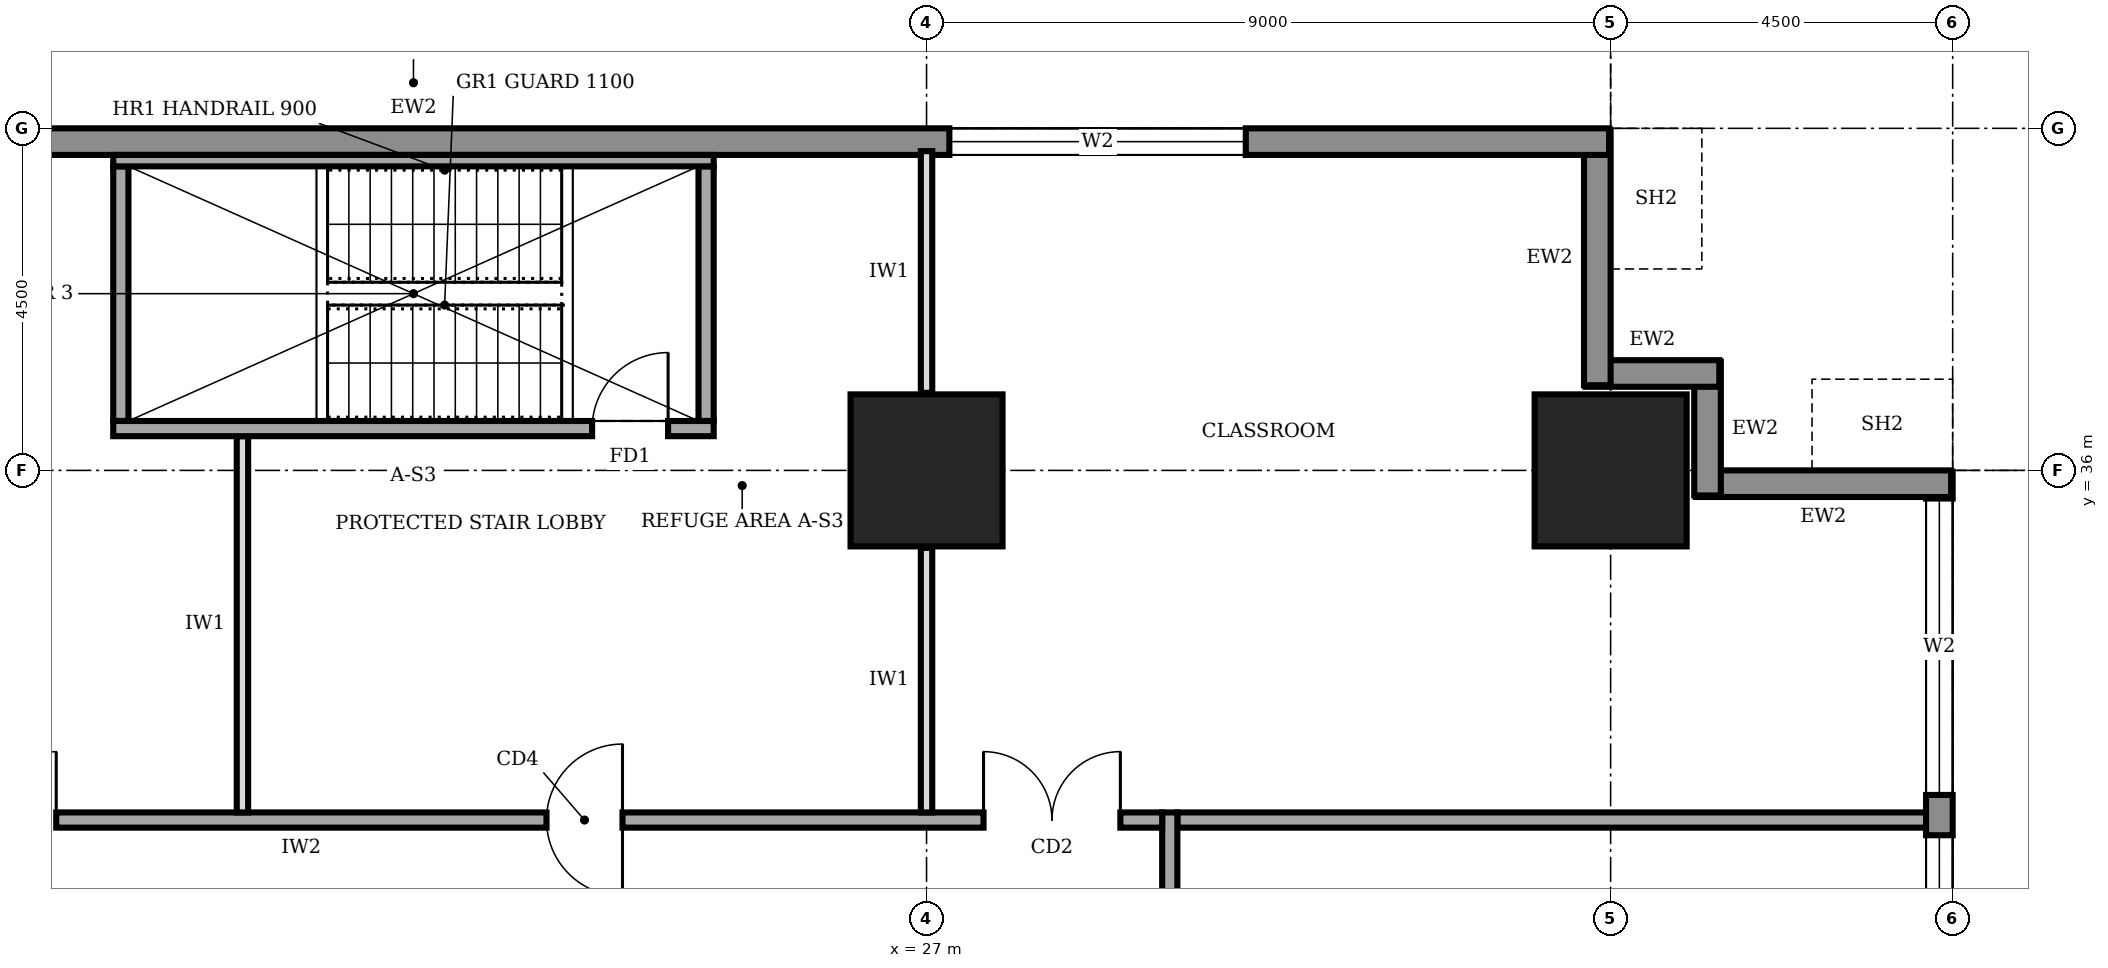
"""IFC4 building model, lengths in metres.
Left out: names, types, materials, properties, quantities, classifications, styles, units other than length and angle.
Written with IfcOpenShell. Run it as: python <this file> out.ifc"""

import sys

from ifc_helpers import new_model, si_unit, direction, frame, frame_2d, origin, origin_2d, place, context, subcontext, project, spatial, rectangle, extrude, element, fill, save


model = new_model("IFC4")
c1 = context("Model", 3, precision=1e-05, world=origin(), true_north=direction((0.0, 1.0)))
c2 = subcontext(c1, "Body", "Model", "MODEL_VIEW")
j1 = project(units=[si_unit("LENGTHUNIT", "METRE"), si_unit("PLANEANGLEUNIT", "RADIAN")], contexts=[c1])
p1 = place(None, origin())
s1 = spatial("IfcSite", under=j1, at=p1, CompositionType="ELEMENT")
p2 = place(p1, origin())
s2 = spatial("IfcBuilding", under=s1, at=p2, CompositionType="ELEMENT")
p3 = place(p2, frame((0.0, 0.0, 69.0)))
s3 = spatial("IfcBuildingStorey", under=s2, at=p3, CompositionType="ELEMENT", Elevation=69.0)
for number, where, z_axis, x_axis in (
    (1, (27.0, 36.0, 0.0), (0.0, 0.0, 1.0), (1.0, 0.0, 0.0)),
    (2, (36.0, 36.0, 0.0), (0.0, 0.0, 1.0), (1.0, 0.0, 0.0)),
):
    element("IfcColumn", number, at=place(p3, frame(where, z_axis=z_axis, x_axis=x_axis)), inside=s3, PredefinedType="COLUMN", context=c2, shape_type="SweptSolid", body=[
        extrude(rectangle(XDim=2.0, YDim=2.0, at=origin_2d()), origin(), (0.0, 0.0, 1.0), 4.0),
    ])
p4 = place(p3, frame((40.325, 4.52, 0.0), z_axis=(0.0, 0.0, 1.0), x_axis=(0.0, 1.0, 0.0)))
e3 = element("IfcWall", 3, at=p4, inside=s3, PredefinedType="STANDARD", context=c2, shape_type="SweptSolid", body=[
    extrude(rectangle(XDim=31.46, YDim=0.35, at=frame_2d((15.73, 0.0))), origin(), (0.0, 0.0, 1.0), 3.75),
])
p5 = place(p4, frame((4.78, 0.0, 0.6)))
e4 = element("IfcOpeningElement", 4, at=p5, cuts=e3, PredefinedType="OPENING", context=c2, shape_type="SweptSolid", body=[
    extrude(rectangle(XDim=3.9, YDim=2.6, at=frame_2d((1.95, 1.3))), frame((0.0, 0.185, 0.0), z_axis=(0.0, -1.0, 0.0), x_axis=(1.0, 0.0, 0.0)), (0.0, 0.0, 1.0), 0.37),
])
p6 = place(p4, frame((9.28, 0.0, 0.6)))
e5 = element("IfcOpeningElement", 5, at=p6, cuts=e3, PredefinedType="OPENING", context=c2, shape_type="SweptSolid", body=[
    extrude(rectangle(XDim=3.9, YDim=2.6, at=frame_2d((1.95, 1.3))), frame((0.0, 0.185, 0.0), z_axis=(0.0, -1.0, 0.0), x_axis=(1.0, 0.0, 0.0)), (0.0, 0.0, 1.0), 0.37),
])
p7 = place(p4, frame((13.78, 0.0, 0.6)))
e6 = element("IfcOpeningElement", 6, at=p7, cuts=e3, PredefinedType="OPENING", context=c2, shape_type="SweptSolid", body=[
    extrude(rectangle(XDim=3.9, YDim=2.6, at=frame_2d((1.95, 1.3))), frame((0.0, 0.185, 0.0), z_axis=(0.0, -1.0, 0.0), x_axis=(1.0, 0.0, 0.0)), (0.0, 0.0, 1.0), 0.37),
])
p8 = place(p4, frame((18.28, 0.0, 0.6)))
e7 = element("IfcOpeningElement", 7, at=p8, cuts=e3, PredefinedType="OPENING", context=c2, shape_type="SweptSolid", body=[
    extrude(rectangle(XDim=3.9, YDim=2.6, at=frame_2d((1.95, 1.3))), frame((0.0, 0.185, 0.0), z_axis=(0.0, -1.0, 0.0), x_axis=(1.0, 0.0, 0.0)), (0.0, 0.0, 1.0), 0.37),
])
p9 = place(p4, frame((22.78, 0.0, 0.6)))
e8 = element("IfcOpeningElement", 8, at=p9, cuts=e3, PredefinedType="OPENING", context=c2, shape_type="SweptSolid", body=[
    extrude(rectangle(XDim=3.9, YDim=2.6, at=frame_2d((1.95, 1.3))), frame((0.0, 0.185, 0.0), z_axis=(0.0, -1.0, 0.0), x_axis=(1.0, 0.0, 0.0)), (0.0, 0.0, 1.0), 0.37),
])
p10 = place(p4, frame((27.21, 0.0, 0.6)))
e9 = element("IfcOpeningElement", 9, at=p10, cuts=e3, PredefinedType="OPENING", context=c2, shape_type="SweptSolid", body=[
    extrude(rectangle(XDim=3.9, YDim=2.6, at=frame_2d((1.95, 1.3))), frame((0.0, 0.185, 0.0), z_axis=(0.0, -1.0, 0.0), x_axis=(1.0, 0.0, 0.0)), (0.0, 0.0, 1.0), 0.37),
])
p11 = place(p3, frame((40.48, 35.825, 0.0), z_axis=(0.0, 0.0, 1.0), x_axis=(-1.0, 0.0, 0.0)))
e10 = element("IfcWall", 10, at=p11, inside=s3, PredefinedType="STANDARD", context=c2, shape_type="SweptSolid", body=[
    extrude(rectangle(XDim=3.36, YDim=0.35, at=frame_2d((1.68, 0.0))), origin(), (0.0, 0.0, 1.0), 2.85),
])
for number, where, z_axis, x_axis in (
    (11, (37.275, 35.67, 0.0), (0.0, 0.0, 1.0), (0.0, 1.0, 0.0)),
    (12, (37.43, 37.275, 0.0), (0.0, 0.0, 1.0), (-1.0, 0.0, 0.0)),
):
    element("IfcWall", number, at=place(p3, frame(where, z_axis=z_axis, x_axis=x_axis)), inside=s3, PredefinedType="STANDARD", context=c2, shape_type="SweptSolid", body=[
        extrude(rectangle(XDim=1.76, YDim=0.35, at=frame_2d((0.88, 0.0))), origin(), (0.0, 0.0, 1.0), 3.75),
    ])
p12 = place(p3, frame((35.825, 37.12, 0.0), z_axis=(0.0, 0.0, 1.0), x_axis=(0.0, 1.0, 0.0)))
e13 = element("IfcWall", 13, at=p12, inside=s3, PredefinedType="STANDARD", context=c2, shape_type="SweptSolid", body=[
    extrude(rectangle(XDim=3.36, YDim=0.35, at=frame_2d((1.68, 0.0))), origin(), (0.0, 0.0, 1.0), 2.85),
])
p13 = place(p3, frame((35.98, 40.325, 0.0), z_axis=(0.0, 0.0, 1.0), x_axis=(-1.0, 0.0, 0.0)))
e14 = element("IfcWall", 14, at=p13, inside=s3, PredefinedType="STANDARD", context=c2, shape_type="SweptSolid", body=[
    extrude(rectangle(XDim=31.46, YDim=0.35, at=frame_2d((15.73, 0.0))), origin(), (0.0, 0.0, 1.0), 3.75),
])
p14 = place(p13, frame((27.21, 0.0, 0.6)))
e15 = element("IfcOpeningElement", 15, at=p14, cuts=e14, PredefinedType="OPENING", context=c2, shape_type="SweptSolid", body=[
    extrude(rectangle(XDim=3.9, YDim=2.6, at=frame_2d((1.95, 1.3))), frame((0.0, 0.185, 0.0), z_axis=(0.0, -1.0, 0.0), x_axis=(1.0, 0.0, 0.0)), (0.0, 0.0, 1.0), 0.37),
])
p15 = place(p13, frame((22.78, 0.0, 0.6)))
e16 = element("IfcOpeningElement", 16, at=p15, cuts=e14, PredefinedType="OPENING", context=c2, shape_type="SweptSolid", body=[
    extrude(rectangle(XDim=3.9, YDim=2.6, at=frame_2d((1.95, 1.3))), frame((0.0, 0.185, 0.0), z_axis=(0.0, -1.0, 0.0), x_axis=(1.0, 0.0, 0.0)), (0.0, 0.0, 1.0), 0.37),
])
p16 = place(p13, frame((4.78, 0.0, 0.6)))
e17 = element("IfcOpeningElement", 17, at=p16, cuts=e14, PredefinedType="OPENING", context=c2, shape_type="SweptSolid", body=[
    extrude(rectangle(XDim=3.9, YDim=2.6, at=frame_2d((1.95, 1.3))), frame((0.0, 0.185, 0.0), z_axis=(0.0, -1.0, 0.0), x_axis=(1.0, 0.0, 0.0)), (0.0, 0.0, 1.0), 0.37),
])
p17 = place(p3, frame((30.2, 9.2, 0.0), z_axis=(0.0, 0.0, 1.0), x_axis=(0.0, 1.0, 0.0)))
e18 = element("IfcWall", 18, at=p17, inside=s3, PredefinedType="SOLIDWALL", context=c2, shape_type="SweptSolid", body=[
    extrude(rectangle(XDim=22.3, YDim=0.2, at=frame_2d((11.15, 0.0))), origin(), (0.0, 0.0, 1.0), 3.75),
])
p18 = place(p17, frame((5.85, 0.0, 0.0)))
e19 = element("IfcOpeningElement", 19, at=p18, cuts=e18, PredefinedType="OPENING", context=c2, shape_type="SweptSolid", body=[
    extrude(rectangle(XDim=1.4, YDim=2.1, at=frame_2d((0.7, 1.05))), frame((0.0, 0.11, 0.0), z_axis=(0.0, -1.0, 0.0), x_axis=(1.0, 0.0, 0.0)), (0.0, 0.0, 1.0), 0.22),
])
p19 = place(p17, frame((17.3, 0.0, 0.0)))
e20 = element("IfcOpeningElement", 20, at=p19, cuts=e18, PredefinedType="OPENING", context=c2, shape_type="SweptSolid", body=[
    extrude(rectangle(XDim=1.0, YDim=2.1, at=frame_2d((0.5, 1.05))), frame((0.0, 0.11, 0.0), z_axis=(0.0, -1.0, 0.0), x_axis=(1.0, 0.0, 0.0)), (0.0, 0.0, 1.0), 0.22),
])
p20 = place(p3, frame((30.1, 31.4, 0.0), z_axis=(0.0, 0.0, 1.0), x_axis=(-1.0, 0.0, 0.0)))
e21 = element("IfcWall", 21, at=p20, inside=s3, PredefinedType="SOLIDWALL", context=c2, shape_type="SweptSolid", body=[
    extrude(rectangle(XDim=18.4, YDim=0.2, at=frame_2d((9.2, 0.0))), origin(), (0.0, 0.0, 1.0), 3.75),
])
p21 = place(p20, frame((14.55, 0.0, 0.0)))
e22 = element("IfcOpeningElement", 22, at=p21, cuts=e21, PredefinedType="OPENING", context=c2, shape_type="SweptSolid", body=[
    extrude(rectangle(XDim=1.4, YDim=2.1, at=frame_2d((0.7, 1.05))), frame((0.0, 0.11, 0.0), z_axis=(0.0, -1.0, 0.0), x_axis=(1.0, 0.0, 0.0)), (0.0, 0.0, 1.0), 0.22),
])
p22 = place(p20, frame((7.1, 0.0, 0.0)))
e23 = element("IfcOpeningElement", 23, at=p22, cuts=e21, PredefinedType="OPENING", context=c2, shape_type="SweptSolid", body=[
    extrude(rectangle(XDim=1.0, YDim=2.1, at=frame_2d((0.5, 1.05))), frame((0.0, 0.11, 0.0), z_axis=(0.0, -1.0, 0.0), x_axis=(1.0, 0.0, 0.0)), (0.0, 0.0, 1.0), 0.22),
])
p23 = place(p20, frame((0.55, 0.0, 0.0)))
e24 = element("IfcOpeningElement", 24, at=p23, cuts=e21, PredefinedType="OPENING", context=c2, shape_type="SweptSolid", body=[
    extrude(rectangle(XDim=1.8, YDim=2.1, at=frame_2d((0.9, 1.05))), frame((0.0, 0.11, 0.0), z_axis=(0.0, -1.0, 0.0), x_axis=(1.0, 0.0, 0.0)), (0.0, 0.0, 1.0), 0.22),
])
p24 = place(p3, frame((30.3, 31.4, 0.0), z_axis=(0.0, 0.0, 1.0), x_axis=(1.0, 0.0, 0.0)))
e25 = element("IfcWall", 25, at=p24, inside=s3, PredefinedType="SOLIDWALL", context=c2, shape_type="SweptSolid", body=[
    extrude(rectangle(XDim=9.9, YDim=0.2, at=frame_2d((4.95, 0.0))), origin(), (0.0, 0.0, 1.0), 3.75),
])
p25 = place(p3, frame((18.0, 31.5, 0.0), z_axis=(0.0, 0.0, 1.0), x_axis=(0.0, 1.0, 0.0)))
e26 = element("IfcWall", 26, at=p25, inside=s3, PredefinedType="PARTITIONING", context=c2, shape_type="SweptSolid", body=[
    extrude(rectangle(XDim=4.95, YDim=0.15, at=frame_2d((2.475, 0.0))), origin(), (0.0, 0.0, 1.0), 3.75),
])
p26 = place(p3, frame((27.0, 31.5, 0.0), z_axis=(0.0, 0.0, 1.0), x_axis=(0.0, 1.0, 0.0)))
e27 = element("IfcWall", 27, at=p26, inside=s3, PredefinedType="PARTITIONING", context=c2, shape_type="SweptSolid", body=[
    extrude(rectangle(XDim=3.48, YDim=0.15, at=frame_2d((1.74, 0.0))), origin(), (0.0, 0.0, 1.0), 2.85),
])
p27 = place(p3, frame((27.0, 37.02, 0.0), z_axis=(0.0, 0.0, 1.0), x_axis=(0.0, 1.0, 0.0)))
e28 = element("IfcWall", 28, at=p27, inside=s3, PredefinedType="PARTITIONING", context=c2, shape_type="SweptSolid", body=[
    extrude(rectangle(XDim=3.18, YDim=0.15, at=frame_2d((1.59, 0.0))), origin(), (0.0, 0.0, 1.0), 2.85),
])
p28 = place(p3, frame((16.3, 36.55, 0.0), z_axis=(0.0, 0.0, 1.0), x_axis=(1.0, 0.0, 0.0)))
e29 = element("IfcWall", 29, at=p28, inside=s3, PredefinedType="SOLIDWALL", context=c2, shape_type="SweptSolid", body=[
    extrude(rectangle(XDim=7.9, YDim=0.2, at=frame_2d((3.95, 0.0))), origin(), (0.0, 0.0, 1.0), 3.75),
])
p29 = place(p28, frame((6.3, 0.0, 0.0)))
e30 = element("IfcOpeningElement", 30, at=p29, cuts=e29, PredefinedType="OPENING", context=c2, shape_type="SweptSolid", body=[
    extrude(rectangle(XDim=1.0, YDim=2.1, at=frame_2d((0.5, 1.05))), frame((0.0, 0.11, 0.0), z_axis=(0.0, -1.0, 0.0), x_axis=(1.0, 0.0, 0.0)), (0.0, 0.0, 1.0), 0.22),
])
p30 = place(p3, frame((16.3, 40.075, 0.0), z_axis=(0.0, 0.0, 1.0), x_axis=(1.0, 0.0, 0.0)))
e31 = element("IfcWall", 31, at=p30, inside=s3, PredefinedType="SOLIDWALL", context=c2, shape_type="SweptSolid", body=[
    extrude(rectangle(XDim=7.9, YDim=0.15, at=frame_2d((3.95, 0.0))), origin(), (0.0, 0.0, 1.0), 3.75),
])
for number, where, z_axis, x_axis in (
    (32, (16.4, 36.65, 0.0), (0.0, 0.0, 1.0), (0.0, 1.0, 0.0)),
    (33, (24.1, 36.65, 0.0), (0.0, 0.0, 1.0), (0.0, 1.0, 0.0)),
):
    element("IfcWall", number, at=place(p3, frame(where, z_axis=z_axis, x_axis=x_axis)), inside=s3, PredefinedType="SOLIDWALL", context=c2, shape_type="SweptSolid", body=[
        extrude(rectangle(XDim=3.35, YDim=0.2, at=frame_2d((1.675, 0.0))), origin(), (0.0, 0.0, 1.0), 3.75),
    ])
p31 = place(p9, origin())
e34 = element("IfcWindow", 34, at=p31, inside=s3, PartitioningType="SINGLE_PANEL", PredefinedType="WINDOW", context=c2, shape_type="SweptSolid", body=[
    extrude(rectangle(XDim=3.9, YDim=2.6, at=frame_2d((1.95, 1.3))), frame((0.0, 0.03, 0.0), z_axis=(0.0, -1.0, 0.0), x_axis=(1.0, 0.0, 0.0)), (0.0, 0.0, 1.0), 0.06),
])
fill(e8, e34)
p32 = place(p10, origin())
e35 = element("IfcWindow", 35, at=p32, inside=s3, PartitioningType="SINGLE_PANEL", PredefinedType="WINDOW", context=c2, shape_type="SweptSolid", body=[
    extrude(rectangle(XDim=3.9, YDim=2.6, at=frame_2d((1.95, 1.3))), frame((0.0, 0.03, 0.0), z_axis=(0.0, -1.0, 0.0), x_axis=(1.0, 0.0, 0.0)), (0.0, 0.0, 1.0), 0.06),
])
fill(e9, e35)
p33 = place(p16, origin())
e36 = element("IfcWindow", 36, at=p33, inside=s3, PartitioningType="SINGLE_PANEL", PredefinedType="WINDOW", context=c2, shape_type="SweptSolid", body=[
    extrude(rectangle(XDim=3.9, YDim=2.6, at=frame_2d((1.95, 1.3))), frame((0.0, 0.03, 0.0), z_axis=(0.0, -1.0, 0.0), x_axis=(1.0, 0.0, 0.0)), (0.0, 0.0, 1.0), 0.06),
])
fill(e17, e36)
p34 = place(p21, frame((1.4, 0.0, 0.0), z_axis=(0.0, 0.0, 1.0), x_axis=(-1.0, 0.0, 0.0)))
e37 = element("IfcDoor", 37, at=p34, inside=s3, OperationType="DOUBLE_DOOR_SINGLE_SWING", PredefinedType="DOOR", context=c2, shape_type="SweptSolid", body=[
    extrude(rectangle(XDim=1.4, YDim=2.1, at=frame_2d((0.7, 1.05))), frame((0.0, 0.025, 0.0), z_axis=(0.0, -1.0, 0.0), x_axis=(1.0, 0.0, 0.0)), (0.0, 0.0, 1.0), 0.05),
])
fill(e22, e37)
p35 = place(p22, origin())
e38 = element("IfcDoor", 38, at=p35, inside=s3, OperationType="DOUBLE_SWING_LEFT", PredefinedType="DOOR", context=c2, shape_type="SweptSolid", body=[
    extrude(rectangle(XDim=1.0, YDim=2.1, at=frame_2d((0.5, 1.05))), frame((0.0, 0.025, 0.0), z_axis=(0.0, -1.0, 0.0), x_axis=(1.0, 0.0, 0.0)), (0.0, 0.0, 1.0), 0.05),
])
fill(e23, e38)
p36 = place(p23, frame((1.8, 0.0, 0.0), z_axis=(0.0, 0.0, 1.0), x_axis=(-1.0, 0.0, 0.0)))
e39 = element("IfcDoor", 39, at=p36, inside=s3, OperationType="DOUBLE_DOOR_SINGLE_SWING", PredefinedType="DOOR", context=c2, shape_type="SweptSolid", body=[
    extrude(rectangle(XDim=1.8, YDim=2.1, at=frame_2d((0.9, 1.05))), frame((0.0, 0.025, 0.0), z_axis=(0.0, -1.0, 0.0), x_axis=(1.0, 0.0, 0.0)), (0.0, 0.0, 1.0), 0.05),
])
fill(e24, e39)
p37 = place(p29, origin())
e40 = element("IfcDoor", 40, at=p37, inside=s3, OperationType="SINGLE_SWING_RIGHT", PredefinedType="DOOR", context=c2, shape_type="SweptSolid", body=[
    extrude(rectangle(XDim=1.0, YDim=2.1, at=frame_2d((0.5, 1.05))), frame((0.0, 0.025, 0.0), z_axis=(0.0, -1.0, 0.0), x_axis=(1.0, 0.0, 0.0)), (0.0, 0.0, 1.0), 0.05),
])
fill(e30, e40)
save(model, sys.argv[1])
